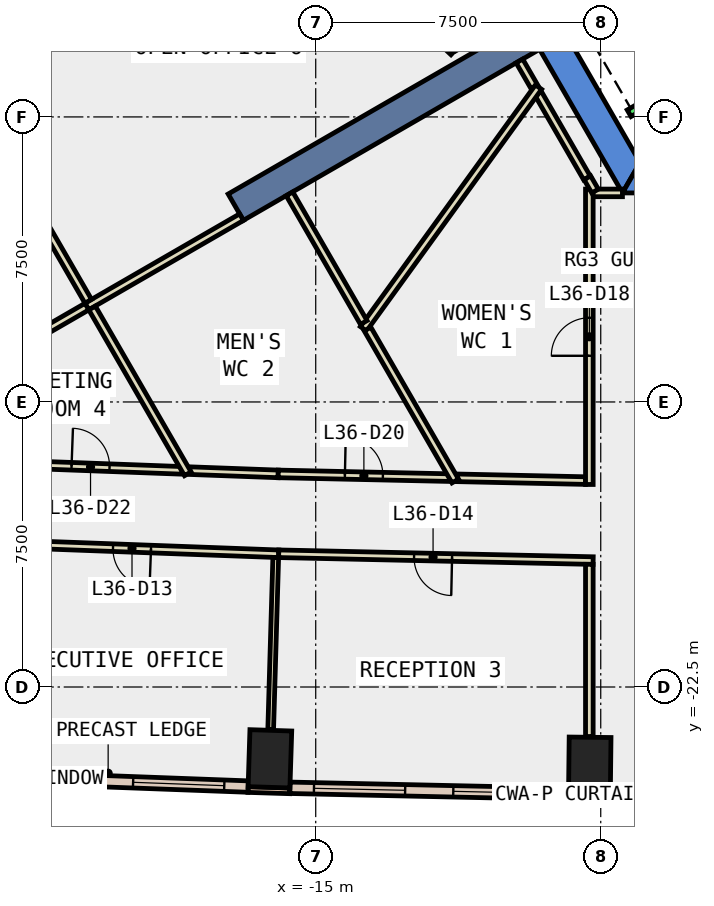
"""IFC4 building model, lengths in metres.
Left out: names, types, materials, properties, quantities, classifications, styles, units other than length and angle.
Written with IfcOpenShell. Run it as: python <this file> out.ifc"""

import sys

from ifc_helpers import new_model, si_unit, direction, frame, frame_2d, origin, origin_2d, place, context, subcontext, project, spatial, polyline, rectangle, outline, extrude, element, fill, save


model = new_model("IFC4")
c1 = context("Model", 3, precision=1e-05, world=origin(), true_north=direction((0.0, 1.0)))
c2 = subcontext(c1, "Body", "Model", "MODEL_VIEW")
j1 = project(units=[si_unit("LENGTHUNIT", "METRE"), si_unit("PLANEANGLEUNIT", "RADIAN")], contexts=[c1])
p1 = place(None, origin())
s1 = spatial("IfcSite", under=j1, at=p1, CompositionType="ELEMENT")
p2 = place(p1, origin())
s2 = spatial("IfcBuilding", under=s1, at=p2, CompositionType="ELEMENT")
p3 = place(p2, frame((0.0, 0.0, 163.4)))
s3 = spatial("IfcBuildingStorey", under=s2, at=p3, CompositionType="ELEMENT", Elevation=163.4)
for number, where, z_axis, x_axis in (
    (1, (-16.205, -24.39, -0.4), (0.0, 0.0, 1.0), (-0.999, 0.032, 0.0)),
    (2, (-7.789, -24.573, -0.4), (0.0, 0.0, 1.0), (-1.0, 0.012, 0.0)),
):
    element("IfcColumn", number, at=place(p3, frame(where, z_axis=z_axis, x_axis=x_axis)), inside=s3, PredefinedType="COLUMN", context=c2, shape_type="SweptSolid", body=[
        extrude(rectangle(XDim=1.1, YDim=1.5, at=origin_2d()), origin(), (0.0, 0.0, 1.0), 4.2),
    ])
p4 = place(p3, frame((0.0, 0.0, -0.4)))
e3 = element("IfcWall", 3, at=p4, inside=s3, PredefinedType="SHEAR", context=c2, shape_type="SweptSolid", body=[
    extrude(outline(polyline([(-13.856, 2.5), (-6.928, -9.5), (-6.466, -8.7), (-12.933, 2.5), (-13.856, 2.5)])), origin(), (0.0, 0.0, 1.0), 4.2),
])
p5 = place(p3, frame((0.0, 0.0, -0.4)))
e4 = element("IfcWall", 4, at=p5, inside=s3, PredefinedType="SHEAR", context=c2, shape_type="SweptSolid", body=[
    extrude(outline(polyline([(3.75, -9.5), (3.75, -8.7), (-6.466, -8.7), (-6.928, -9.5), (3.75, -9.5)])), origin(), (0.0, 0.0, 1.0), 4.2),
])
p6 = place(p3, frame((-9.31, -5.375, -0.4), z_axis=(0.0, 0.0, 1.0), x_axis=(-0.866017533419, -0.500013631625, 0.0)))
e5 = element("IfcWall", 5, at=p6, inside=s3, PredefinedType="SHEAR", context=c2, shape_type="SweptSolid", body=[
    extrude(rectangle(XDim=9.0, YDim=0.8, at=frame_2d((4.5, 0.0))), origin(), (0.0, 0.0, 1.0), 4.2),
])
p7 = place(p3, frame((-16.781, -25.198, 0.0), z_axis=(0.0, 0.0, 1.0), x_axis=(0.999523702549, -0.030860460829, 0.0)))
e6 = element("IfcWall", 6, at=p7, inside=s3, PredefinedType="STANDARD", context=c2, shape_type="SweptSolid", body=[
    extrude(rectangle(XDim=1.1, YDim=0.15, at=frame_2d((0.55, 0.0))), origin(), (0.0, 0.0, 1.0), 3.8),
])
p8 = place(p3, frame((-8.349, -25.392, 0.0), z_axis=(0.0, 0.0, 1.0), x_axis=(0.999940879068, -0.010873746799, 0.0)))
e7 = element("IfcWall", 7, at=p8, inside=s3, PredefinedType="STANDARD", context=c2, shape_type="SweptSolid", body=[
    extrude(rectangle(XDim=1.1, YDim=0.15, at=frame_2d((0.55, 0.0))), origin(), (0.0, 0.0, 1.0), 3.8),
])
p9 = place(p3, frame((-24.09, -24.848, 0.0), z_axis=(0.0, 0.0, 1.0), x_axis=(0.999307730926, -0.037202942236, 0.0)))
e8 = element("IfcWall", 8, at=p9, inside=s3, PredefinedType="STANDARD", context=c2, shape_type="SweptSolid", body=[
    extrude(rectangle(XDim=7.317, YDim=0.3, at=frame_2d((3.659, 0.0))), origin(), (0.0, 0.0, 1.0), 3.8),
])
p10 = place(p9, frame((0.629, 0.0, 0.9)))
e9 = element("IfcOpeningElement", 9, at=p10, cuts=e8, PredefinedType="OPENING", context=c2, shape_type="SweptSolid", body=[
    extrude(rectangle(XDim=2.4, YDim=2.6, at=frame_2d((1.2, 1.3))), frame((0.0, 0.16, 0.0), z_axis=(0.0, -1.0, 0.0), x_axis=(1.0, 0.0, 0.0)), (0.0, 0.0, 1.0), 0.32),
])
p11 = place(p9, frame((4.288, 0.0, 0.9)))
e10 = element("IfcOpeningElement", 10, at=p11, cuts=e8, PredefinedType="OPENING", context=c2, shape_type="SweptSolid", body=[
    extrude(rectangle(XDim=2.4, YDim=2.6, at=frame_2d((1.2, 1.3))), frame((0.0, 0.16, 0.0), z_axis=(0.0, -1.0, 0.0), x_axis=(1.0, 0.0, 0.0)), (0.0, 0.0, 1.0), 0.32),
])
p12 = place(p3, frame((-15.68, -25.152, 0.0), z_axis=(0.0, 0.0, 1.0), x_axis=(0.999765201774, -0.021668902196, 0.0)))
e11 = element("IfcWall", 11, at=p12, inside=s3, PredefinedType="STANDARD", context=c2, shape_type="SweptSolid", body=[
    extrude(rectangle(XDim=7.335, YDim=0.3, at=frame_2d((3.667, 0.0))), origin(), (0.0, 0.0, 1.0), 3.8),
])
p13 = place(p12, frame((0.634, 0.0, 0.9)))
e12 = element("IfcOpeningElement", 12, at=p13, cuts=e11, PredefinedType="OPENING", context=c2, shape_type="SweptSolid", body=[
    extrude(rectangle(XDim=2.4, YDim=2.6, at=frame_2d((1.2, 1.3))), frame((0.0, 0.16, 0.0), z_axis=(0.0, -1.0, 0.0), x_axis=(1.0, 0.0, 0.0)), (0.0, 0.0, 1.0), 0.32),
])
p14 = place(p12, frame((4.301, 0.0, 0.9)))
e13 = element("IfcOpeningElement", 13, at=p14, cuts=e11, PredefinedType="OPENING", context=c2, shape_type="SweptSolid", body=[
    extrude(rectangle(XDim=2.4, YDim=2.6, at=frame_2d((1.2, 1.3))), frame((0.0, 0.16, 0.0), z_axis=(0.0, -1.0, 0.0), x_axis=(1.0, 0.0, 0.0)), (0.0, 0.0, 1.0), 0.32),
])
p15 = place(p3, frame((-11.278, -16.996, 0.0), z_axis=(0.0, 0.0, 1.0), x_axis=(0.999766613119, -0.021603687022, 0.0)))
e14 = element("IfcWall", 14, at=p15, inside=s3, PredefinedType="PARTITIONING", context=c2, shape_type="SweptSolid", body=[
    extrude(rectangle(XDim=3.379, YDim=0.2, at=frame_2d((1.689, 0.0))), origin(), (0.0, 0.0, 1.0), 3.8),
])
p16 = place(p3, frame((-19.506, -0.785, 0.0), z_axis=(0.0, 0.0, 1.0), x_axis=(-0.477513909405, -0.878624189472, 0.0)))
e15 = element("IfcWall", 15, at=p16, inside=s3, PredefinedType="PARTITIONING", context=c2, shape_type="SweptSolid", body=[
    extrude(rectangle(XDim=6.956, YDim=0.2, at=frame_2d((3.478, 0.0))), origin(), (0.0, 0.0, 1.0), 3.8),
])
p17 = place(p16, frame((2.978, 0.0, 0.0)))
e16 = element("IfcOpeningElement", 16, at=p17, cuts=e15, PredefinedType="OPENING", context=c2, shape_type="SweptSolid", body=[
    extrude(rectangle(XDim=1.0, YDim=2.1, at=frame_2d((0.5, 1.05))), frame((0.0, 0.11, 0.0), z_axis=(0.0, -1.0, 0.0), x_axis=(1.0, 0.0, 0.0)), (0.0, 0.0, 1.0), 0.22),
])
p18 = place(p3, frame((-18.316, -16.807, 0.0), z_axis=(0.0, 0.0, 1.0), x_axis=(0.999315981353, -0.036980662692, 0.0)))
e17 = element("IfcWall", 17, at=p18, inside=s3, PredefinedType="PARTITIONING", context=c2, shape_type="SweptSolid", body=[
    extrude(rectangle(XDim=2.331, YDim=0.2, at=frame_2d((1.165, 0.0))), origin(), (0.0, 0.0, 1.0), 3.8),
])
p19 = place(p3, frame((-15.987, -16.893, 0.0), z_axis=(0.0, 0.0, 1.0), x_axis=(0.999764376572, -0.021706942174, 0.0)))
e18 = element("IfcWall", 18, at=p19, inside=s3, PredefinedType="PARTITIONING", context=c2, shape_type="SweptSolid", body=[
    extrude(rectangle(XDim=4.51, YDim=0.2, at=frame_2d((2.255, 0.0))), origin(), (0.0, 0.0, 1.0), 3.8),
])
p20 = place(p19, frame((1.755, 0.0, 0.0)))
e19 = element("IfcOpeningElement", 19, at=p20, cuts=e18, PredefinedType="OPENING", context=c2, shape_type="SweptSolid", body=[
    extrude(rectangle(XDim=1.0, YDim=2.1, at=frame_2d((0.5, 1.05))), frame((0.0, 0.11, 0.0), z_axis=(0.0, -1.0, 0.0), x_axis=(1.0, 0.0, 0.0)), (0.0, 0.0, 1.0), 0.22),
])
p21 = place(p3, frame((-23.337, -16.621, 0.0), z_axis=(0.0, 0.0, 1.0), x_axis=(0.999311710526, -0.037095892019, 0.0)))
e20 = element("IfcWall", 20, at=p21, inside=s3, PredefinedType="PARTITIONING", context=c2, shape_type="SweptSolid", body=[
    extrude(rectangle(XDim=4.824, YDim=0.2, at=frame_2d((2.412, 0.0))), origin(), (0.0, 0.0, 1.0), 3.8),
])
p22 = place(p21, frame((1.913, 0.0, 0.0)))
e21 = element("IfcOpeningElement", 21, at=p22, cuts=e20, PredefinedType="OPENING", context=c2, shape_type="SweptSolid", body=[
    extrude(rectangle(XDim=1.0, YDim=2.1, at=frame_2d((0.5, 1.05))), frame((0.0, 0.11, 0.0), z_axis=(0.0, -1.0, 0.0), x_axis=(1.0, 0.0, 0.0)), (0.0, 0.0, 1.0), 0.22),
])
p23 = place(p3, frame((-24.68, -5.906, 0.0), z_axis=(0.0, 0.0, 1.0), x_axis=(0.47757676389, 0.878590026459, 0.0)))
e22 = element("IfcWall", 22, at=p23, inside=s3, PredefinedType="PARTITIONING", context=c2, shape_type="SweptSolid", body=[
    extrude(rectangle(XDim=6.91, YDim=0.2, at=frame_2d((3.455, 0.0))), origin(), (0.0, 0.0, 1.0), 3.8),
])
p24 = place(p23, frame((3.029, 0.0, 0.0)))
e23 = element("IfcOpeningElement", 23, at=p24, cuts=e22, PredefinedType="OPENING", context=c2, shape_type="SweptSolid", body=[
    extrude(rectangle(XDim=1.0, YDim=2.1, at=frame_2d((0.5, 1.05))), frame((0.0, 0.11, 0.0), z_axis=(0.0, -1.0, 0.0), x_axis=(1.0, 0.0, 0.0)), (0.0, 0.0, 1.0), 0.22),
])
p25 = place(p3, frame((-15.974, -18.995, 0.0), z_axis=(0.0, 0.0, 1.0), x_axis=(-0.999314011084, 0.037033866276, 0.0)))
e24 = element("IfcWall", 24, at=p25, inside=s3, PredefinedType="PARTITIONING", context=c2, shape_type="SweptSolid", body=[
    extrude(rectangle(XDim=7.726, YDim=0.2, at=frame_2d((3.863, 0.0))), origin(), (0.0, 0.0, 1.0), 3.8),
])
p26 = place(p25, frame((3.363, 0.0, 0.0)))
e25 = element("IfcOpeningElement", 25, at=p26, cuts=e24, PredefinedType="OPENING", context=c2, shape_type="SweptSolid", body=[
    extrude(rectangle(XDim=1.0, YDim=2.1, at=frame_2d((0.5, 1.05))), frame((0.0, 0.11, 0.0), z_axis=(0.0, -1.0, 0.0), x_axis=(1.0, 0.0, 0.0)), (0.0, 0.0, 1.0), 0.22),
])
p27 = place(p3, frame((-7.7, -19.174, 0.0), z_axis=(0.0, 0.0, 1.0), x_axis=(-0.999762993889, 0.02177053169, 0.0)))
e26 = element("IfcWall", 26, at=p27, inside=s3, PredefinedType="PARTITIONING", context=c2, shape_type="SweptSolid", body=[
    extrude(rectangle(XDim=8.276, YDim=0.2, at=frame_2d((4.138, 0.0))), origin(), (0.0, 0.0, 1.0), 3.8),
])
p28 = place(p27, frame((3.713, 0.0, 0.0)))
e27 = element("IfcOpeningElement", 27, at=p28, cuts=e26, PredefinedType="OPENING", context=c2, shape_type="SweptSolid", body=[
    extrude(rectangle(XDim=1.0, YDim=2.1, at=frame_2d((0.5, 1.05))), frame((0.0, 0.11, 0.0), z_axis=(0.0, -1.0, 0.0), x_axis=(1.0, 0.0, 0.0)), (0.0, 0.0, 1.0), 0.22),
])
p29 = place(p3, frame((-7.722, -9.499, 0.0), z_axis=(0.0, 0.0, 1.0), x_axis=(1.0, 0.0, 0.0)))
e28 = element("IfcWall", 28, at=p29, inside=s3, PredefinedType="PARTITIONING", context=c2, shape_type="SweptSolid", body=[
    extrude(rectangle(XDim=0.793, YDim=0.2, at=frame_2d((0.396, 0.0))), origin(), (0.0, 0.0, 1.0), 3.8),
])
p30 = place(p3, frame((-7.8, -17.171, 0.0), z_axis=(0.0, 0.0, 1.0), x_axis=(0.0, 1.0, 0.0)))
e29 = element("IfcWall", 29, at=p30, inside=s3, PredefinedType="PARTITIONING", context=c2, shape_type="SweptSolid", body=[
    extrude(rectangle(XDim=7.772, YDim=0.2, at=frame_2d((3.886, 0.0))), origin(), (0.0, 0.0, 1.0), 3.8),
])
p31 = place(p30, frame((3.386, 0.0, 0.0)))
e30 = element("IfcOpeningElement", 30, at=p31, cuts=e29, PredefinedType="OPENING", context=c2, shape_type="SweptSolid", body=[
    extrude(rectangle(XDim=1.0, YDim=2.1, at=frame_2d((0.5, 1.05))), frame((0.0, 0.11, 0.0), z_axis=(0.0, -1.0, 0.0), x_axis=(1.0, 0.0, 0.0)), (0.0, 0.0, 1.0), 0.22),
])
p32 = place(p3, frame((-7.8, -23.803, 0.0), z_axis=(0.0, 0.0, 1.0), x_axis=(0.0, 1.0, 0.0)))
e31 = element("IfcWall", 31, at=p32, inside=s3, PredefinedType="PARTITIONING", context=c2, shape_type="SweptSolid", body=[
    extrude(rectangle(XDim=4.531, YDim=0.2, at=frame_2d((2.266, 0.0))), origin(), (0.0, 0.0, 1.0), 3.8),
])
p33 = place(p3, frame((-7.862, -9.107, 0.0), z_axis=(0.0, 0.0, 1.0), x_axis=(-0.499994038704, 0.866028845513, 0.0)))
e32 = element("IfcWall", 32, at=p33, inside=s3, PredefinedType="PARTITIONING", context=c2, shape_type="SweptSolid", body=[
    extrude(rectangle(XDim=2.568, YDim=0.2, at=frame_2d((1.284, 0.0))), origin(), (0.0, 0.0, 1.0), 3.8),
])
p34 = place(p3, frame((-7.65, -9.451, 0.0), z_axis=(0.0, 0.0, 1.0), x_axis=(-0.500297731093, 0.865853440406, 0.0)))
e33 = element("IfcWall", 33, at=p34, inside=s3, PredefinedType="PARTITIONING", context=c2, shape_type="SweptSolid", body=[
    extrude(rectangle(XDim=0.404, YDim=0.2, at=frame_2d((0.202, 0.0))), origin(), (0.0, 0.0, 1.0), 3.8),
])
p35 = place(p3, frame((-9.246, -6.71, 0.0), z_axis=(0.0, 0.0, 1.0), x_axis=(-0.499570510076, 0.86627322795, 0.0)))
e34 = element("IfcWall", 34, at=p35, inside=s3, PredefinedType="PARTITIONING", context=c2, shape_type="SweptSolid", body=[
    extrude(rectangle(XDim=0.788, YDim=0.2, at=frame_2d((0.394, 0.0))), origin(), (0.0, 0.0, 1.0), 3.8),
])
p36 = place(p3, frame((-11.372, -5.79, 0.0), z_axis=(0.0, 0.0, 1.0), x_axis=(-0.730922728623, 0.682460229451, 0.0)))
e35 = element("IfcWall", 35, at=p36, inside=s3, PredefinedType="PARTITIONING", context=c2, shape_type="SweptSolid", body=[
    extrude(rectangle(XDim=9.924, YDim=0.2, at=frame_2d((4.962, 0.0))), origin(), (0.0, 0.0, 1.0), 3.8),
])
p37 = place(p3, frame((-13.744, -13.076, 0.0), z_axis=(0.0, 0.0, 1.0), x_axis=(0.586577314901, 0.809893235953, 0.0)))
e36 = element("IfcWall", 36, at=p37, inside=s3, PredefinedType="PARTITIONING", context=c2, shape_type="SweptSolid", body=[
    extrude(rectangle(XDim=7.854, YDim=0.2, at=frame_2d((3.927, 0.0))), origin(), (0.0, 0.0, 1.0), 3.8),
])
p38 = place(p3, frame((-11.328, -17.08, 0.0), z_axis=(0.0, 0.0, 1.0), x_axis=(-0.499972710878, 0.866041158593, 0.0)))
e37 = element("IfcWall", 37, at=p38, inside=s3, PredefinedType="PARTITIONING", context=c2, shape_type="SweptSolid", body=[
    extrude(rectangle(XDim=4.616, YDim=0.2, at=frame_2d((2.308, 0.0))), origin(), (0.0, 0.0, 1.0), 3.8),
])
p39 = place(p3, frame((-13.736, -12.909, 0.0), z_axis=(0.0, 0.0, 1.0), x_axis=(-0.49990810406, 0.866078453429, 0.0)))
e38 = element("IfcWall", 38, at=p39, inside=s3, PredefinedType="PARTITIONING", context=c2, shape_type="SweptSolid", body=[
    extrude(rectangle(XDim=3.908, YDim=0.2, at=frame_2d((1.954, 0.0))), origin(), (0.0, 0.0, 1.0), 3.8),
])
p40 = place(p3, frame((-16.952, -10.138, 0.0), z_axis=(0.0, 0.0, 1.0), x_axis=(-0.866054992606, -0.499948747156, 0.0)))
e39 = element("IfcWall", 39, at=p40, inside=s3, PredefinedType="PARTITIONING", context=c2, shape_type="SweptSolid", body=[
    extrude(rectangle(XDim=4.701, YDim=0.2, at=frame_2d((2.35, 0.0))), origin(), (0.0, 0.0, 1.0), 3.8),
])
p41 = place(p3, frame((-20.986, -12.351, 0.0), z_axis=(0.0, 0.0, 1.0), x_axis=(-0.499993851206, 0.866028953763, 0.0)))
e40 = element("IfcWall", 40, at=p41, inside=s3, PredefinedType="PARTITIONING", context=c2, shape_type="SweptSolid", body=[
    extrude(rectangle(XDim=4.932, YDim=0.2, at=frame_2d((2.466, 0.0))), origin(), (0.0, 0.0, 1.0), 3.8),
])
p42 = place(p3, frame((-18.366, -16.89, 0.0), z_axis=(0.0, 0.0, 1.0), x_axis=(-0.499965828395, 0.866045131871, 0.0)))
e41 = element("IfcWall", 41, at=p42, inside=s3, PredefinedType="PARTITIONING", context=c2, shape_type="SweptSolid", body=[
    extrude(rectangle(XDim=5.036, YDim=0.2, at=frame_2d((2.518, 0.0))), origin(), (0.0, 0.0, 1.0), 3.8),
])
p43 = place(p3, frame((-21.021, -12.491, 0.0), z_axis=(0.0, 0.0, 1.0), x_axis=(-0.865966890845, -0.500101333692, 0.0)))
e42 = element("IfcWall", 42, at=p43, inside=s3, PredefinedType="PARTITIONING", context=c2, shape_type="SweptSolid", body=[
    extrude(rectangle(XDim=5.931, YDim=0.2, at=frame_2d((2.965, 0.0))), origin(), (0.0, 0.0, 1.0), 3.8),
])
p44 = place(p3, frame((-16.052, -19.092, 0.0), z_axis=(0.0, 0.0, 1.0), x_axis=(-0.029372127975, -0.999568545973, 0.0)))
e43 = element("IfcWall", 43, at=p44, inside=s3, PredefinedType="PARTITIONING", context=c2, shape_type="SweptSolid", body=[
    extrude(rectangle(XDim=4.53, YDim=0.15, at=frame_2d((2.265, 0.0))), origin(), (0.0, 0.0, 1.0), 3.8),
])
p45 = place(p3, frame((-9.751, 2.99, 0.0), z_axis=(0.0, 0.0, 1.0), x_axis=(0.50000090737, -0.866024879913, 0.0)))
e44 = element("IfcWall", 44, at=p45, inside=s3, PredefinedType="STANDARD", context=c2, shape_type="SweptSolid", body=[
    extrude(rectangle(XDim=10.6, YDim=0.2, at=frame_2d((5.3, 0.0))), origin(), (0.0, 0.0, 1.0), 3.8),
])
p46 = place(p3, frame((-4.588, -6.153, 0.0), z_axis=(0.0, 0.0, 1.0), x_axis=(-0.866022959057, -0.500004234368, 0.0)))
e45 = element("IfcWall", 45, at=p46, inside=s3, PredefinedType="STANDARD", context=c2, shape_type="SweptSolid", body=[
    extrude(rectangle(XDim=2.5, YDim=0.2, at=frame_2d((1.25, 0.0))), origin(), (0.0, 0.0, 1.0), 3.8),
])
p47 = place(p10, origin())
e46 = element("IfcWindow", 46, at=p47, inside=s3, PartitioningType="SINGLE_PANEL", PredefinedType="WINDOW", context=c2, shape_type="SweptSolid", body=[
    extrude(rectangle(XDim=2.4, YDim=2.6, at=frame_2d((1.2, 1.3))), frame((0.0, 0.03, 0.0), z_axis=(0.0, -1.0, 0.0), x_axis=(1.0, 0.0, 0.0)), (0.0, 0.0, 1.0), 0.06),
])
fill(e9, e46)
p48 = place(p11, origin())
e47 = element("IfcWindow", 47, at=p48, inside=s3, PartitioningType="SINGLE_PANEL", PredefinedType="WINDOW", context=c2, shape_type="SweptSolid", body=[
    extrude(rectangle(XDim=2.4, YDim=2.6, at=frame_2d((1.2, 1.3))), frame((0.0, 0.03, 0.0), z_axis=(0.0, -1.0, 0.0), x_axis=(1.0, 0.0, 0.0)), (0.0, 0.0, 1.0), 0.06),
])
fill(e10, e47)
p49 = place(p13, origin())
e48 = element("IfcWindow", 48, at=p49, inside=s3, PartitioningType="SINGLE_PANEL", PredefinedType="WINDOW", context=c2, shape_type="SweptSolid", body=[
    extrude(rectangle(XDim=2.4, YDim=2.6, at=frame_2d((1.2, 1.3))), frame((0.0, 0.03, 0.0), z_axis=(0.0, -1.0, 0.0), x_axis=(1.0, 0.0, 0.0)), (0.0, 0.0, 1.0), 0.06),
])
fill(e12, e48)
p50 = place(p14, origin())
e49 = element("IfcWindow", 49, at=p50, inside=s3, PartitioningType="SINGLE_PANEL", PredefinedType="WINDOW", context=c2, shape_type="SweptSolid", body=[
    extrude(rectangle(XDim=2.4, YDim=2.6, at=frame_2d((1.2, 1.3))), frame((0.0, 0.03, 0.0), z_axis=(0.0, -1.0, 0.0), x_axis=(1.0, 0.0, 0.0)), (0.0, 0.0, 1.0), 0.06),
])
fill(e13, e49)
p51 = place(p26, origin())
e50 = element("IfcDoor", 50, at=p51, inside=s3, OperationType="SINGLE_SWING_LEFT", PredefinedType="DOOR", context=c2, shape_type="SweptSolid", body=[
    extrude(rectangle(XDim=1.0, YDim=2.1, at=frame_2d((0.5, 1.05))), frame((0.0, 0.025, 0.0), z_axis=(0.0, -1.0, 0.0), x_axis=(1.0, 0.0, 0.0)), (0.0, 0.0, 1.0), 0.05),
])
fill(e25, e50)
p52 = place(p28, origin())
e51 = element("IfcDoor", 51, at=p52, inside=s3, OperationType="SINGLE_SWING_RIGHT", PredefinedType="DOOR", context=c2, shape_type="SweptSolid", body=[
    extrude(rectangle(XDim=1.0, YDim=2.1, at=frame_2d((0.5, 1.05))), frame((0.0, 0.025, 0.0), z_axis=(0.0, -1.0, 0.0), x_axis=(1.0, 0.0, 0.0)), (0.0, 0.0, 1.0), 0.05),
])
fill(e27, e51)
p53 = place(p31, origin())
e52 = element("IfcDoor", 52, at=p53, inside=s3, OperationType="SINGLE_SWING_LEFT", PredefinedType="DOOR", context=c2, shape_type="SweptSolid", body=[
    extrude(rectangle(XDim=1.0, YDim=2.1, at=frame_2d((0.5, 1.05))), frame((0.0, 0.025, 0.0), z_axis=(0.0, -1.0, 0.0), x_axis=(1.0, 0.0, 0.0)), (0.0, 0.0, 1.0), 0.05),
])
fill(e30, e52)
p54 = place(p20, origin())
e53 = element("IfcDoor", 53, at=p54, inside=s3, OperationType="SINGLE_SWING_LEFT", PredefinedType="DOOR", context=c2, shape_type="SweptSolid", body=[
    extrude(rectangle(XDim=1.0, YDim=2.1, at=frame_2d((0.5, 1.05))), frame((0.0, 0.025, 0.0), z_axis=(0.0, -1.0, 0.0), x_axis=(1.0, 0.0, 0.0)), (0.0, 0.0, 1.0), 0.05),
])
fill(e19, e53)
p55 = place(p22, origin())
e54 = element("IfcDoor", 54, at=p55, inside=s3, OperationType="SINGLE_SWING_LEFT", PredefinedType="DOOR", context=c2, shape_type="SweptSolid", body=[
    extrude(rectangle(XDim=1.0, YDim=2.1, at=frame_2d((0.5, 1.05))), frame((0.0, 0.025, 0.0), z_axis=(0.0, -1.0, 0.0), x_axis=(1.0, 0.0, 0.0)), (0.0, 0.0, 1.0), 0.05),
])
fill(e21, e54)
save(model, sys.argv[1])
